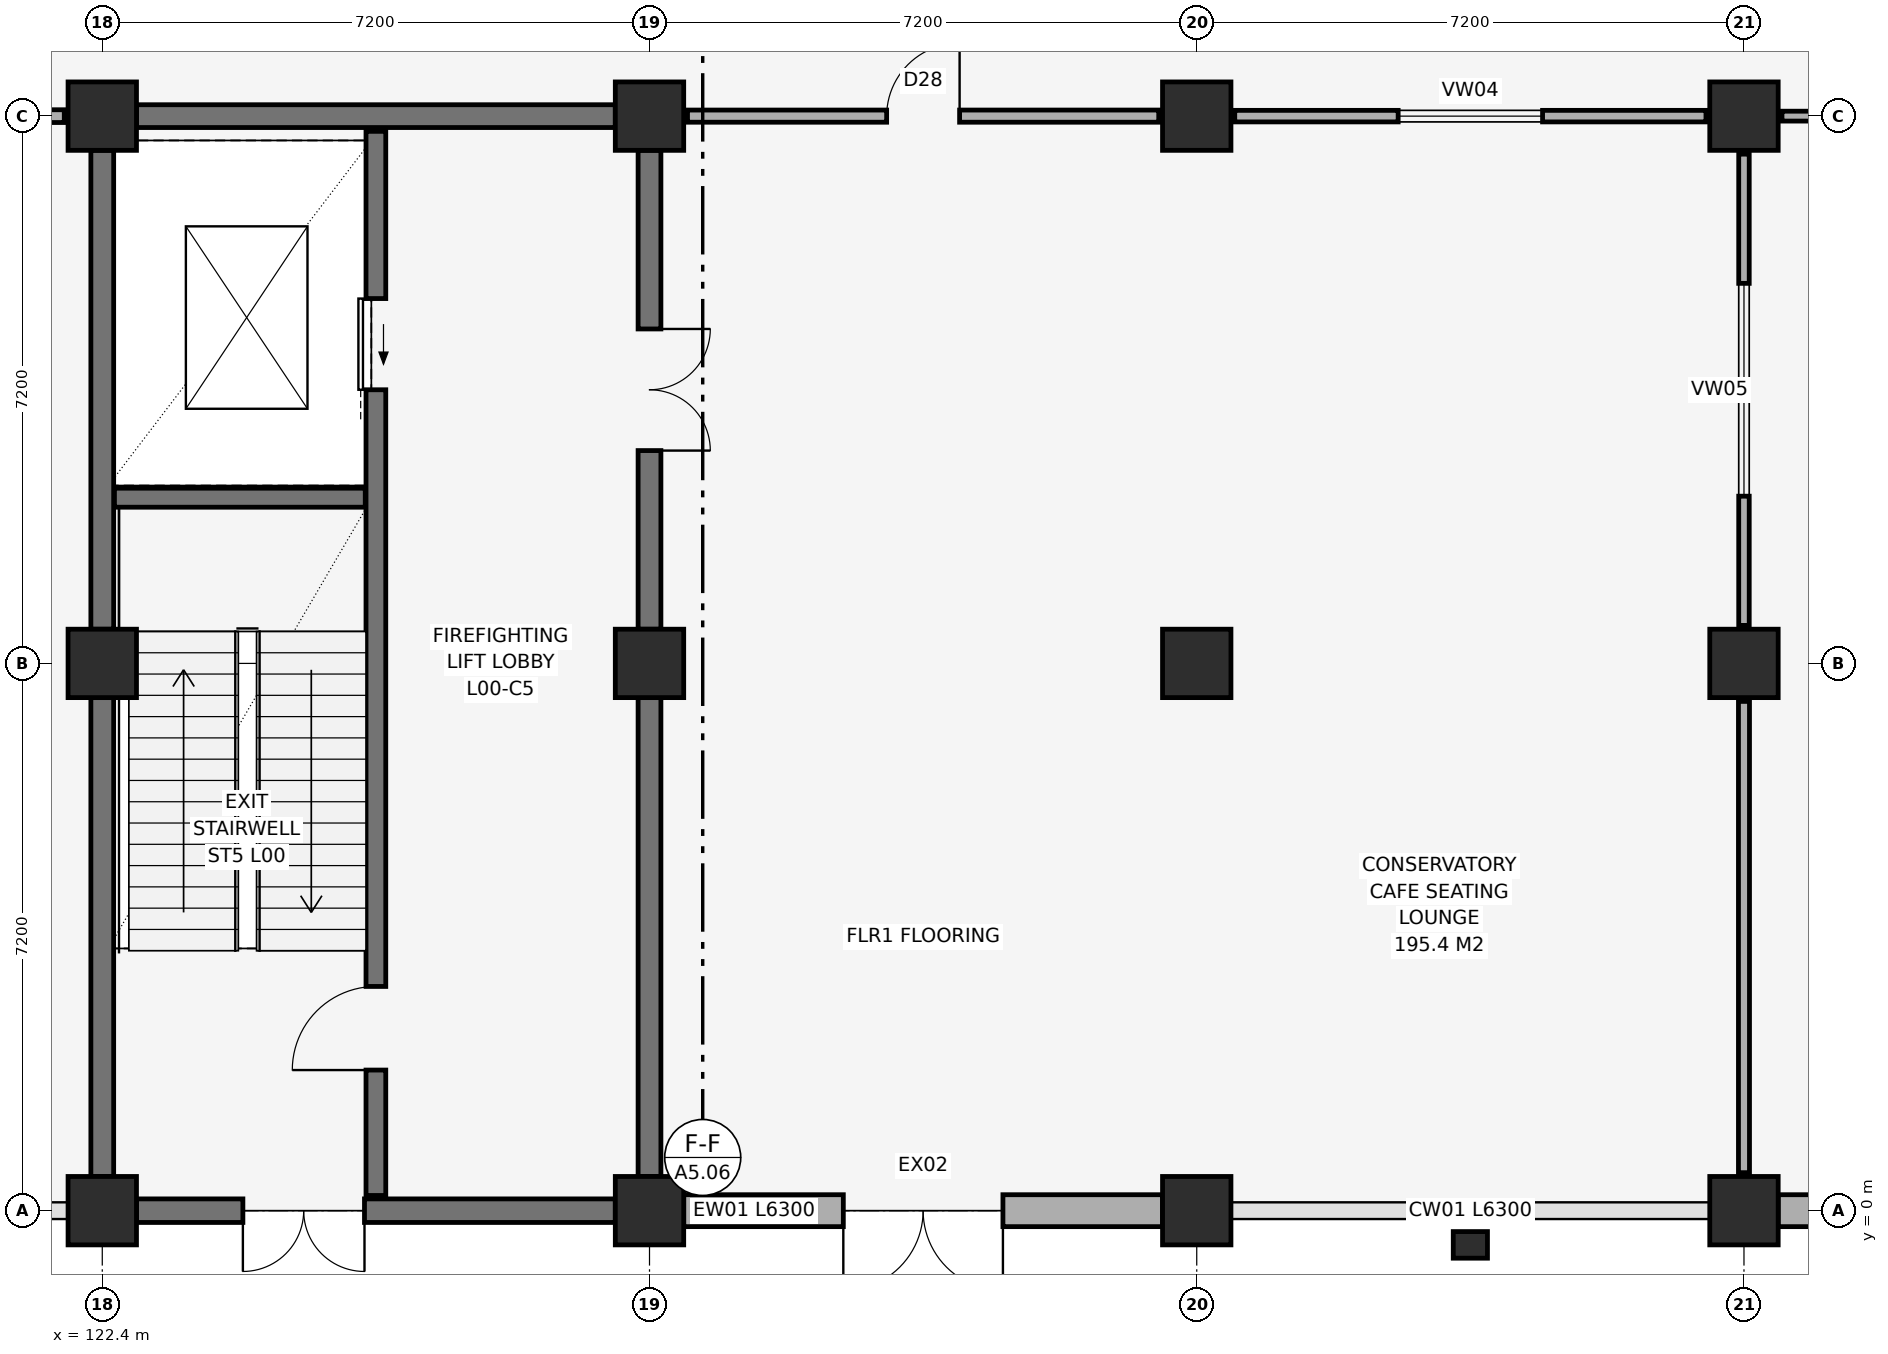
"""IFC4 building model, lengths in metres.
Left out: names, types, materials, properties, quantities, classifications, styles, units other than length and angle.
Written with IfcOpenShell. Run it as: python <this file> out.ifc"""

import sys

from ifc_helpers import new_model, si_unit, direction, frame, frame_2d, origin, origin_2d, place, context, subcontext, project, spatial, rectangle, extrude, element, fill, save


model = new_model("IFC4")
c1 = context("Model", 3, precision=1e-05, world=origin(), true_north=direction((0.0, 1.0)))
c2 = subcontext(c1, "Body", "Model", "MODEL_VIEW")
j1 = project(units=[si_unit("LENGTHUNIT", "METRE"), si_unit("PLANEANGLEUNIT", "RADIAN")], contexts=[c1])
p1 = place(None, origin())
s1 = spatial("IfcSite", under=j1, at=p1, CompositionType="ELEMENT")
p2 = place(p1, origin())
s2 = spatial("IfcBuilding", under=s1, at=p2, CompositionType="ELEMENT")
p3 = place(p2, origin())
s3 = spatial("IfcBuildingStorey", under=s2, at=p3, CompositionType="ELEMENT", Elevation=0.0)
for number, where, z_axis, x_axis in (
    (1, (122.4, 0.0, 0.0), (0.0, 0.0, 1.0), (1.0, 0.0, 0.0)),
    (2, (122.4, 7.2, 0.0), (0.0, 0.0, 1.0), (1.0, 0.0, 0.0)),
    (3, (122.4, 14.4, 0.0), (0.0, 0.0, 1.0), (1.0, 0.0, 0.0)),
    (4, (129.6, 0.0, 0.0), (0.0, 0.0, 1.0), (1.0, 0.0, 0.0)),
    (5, (129.6, 7.2, 0.0), (0.0, 0.0, 1.0), (1.0, 0.0, 0.0)),
    (6, (129.6, 14.4, 0.0), (0.0, 0.0, 1.0), (1.0, 0.0, 0.0)),
    (7, (136.8, 0.0, 0.0), (0.0, 0.0, 1.0), (1.0, 0.0, 0.0)),
    (8, (136.8, 7.2, 0.0), (0.0, 0.0, 1.0), (1.0, 0.0, 0.0)),
    (9, (136.8, 14.4, 0.0), (0.0, 0.0, 1.0), (1.0, 0.0, 0.0)),
    (10, (144.0, 0.0, 0.0), (0.0, 0.0, 1.0), (1.0, 0.0, 0.0)),
    (11, (144.0, 7.2, 0.0), (0.0, 0.0, 1.0), (1.0, 0.0, 0.0)),
    (12, (144.0, 14.4, 0.0), (0.0, 0.0, 1.0), (1.0, 0.0, 0.0)),
):
    element("IfcColumn", number, at=place(p3, frame(where, z_axis=z_axis, x_axis=x_axis)), inside=s3, PredefinedType="COLUMN", context=c2, shape_type="SweptSolid", body=[
        extrude(rectangle(XDim=0.9, YDim=0.9, at=origin_2d()), origin(), (0.0, 0.0, 1.0), 5.4),
    ])
p4 = place(p3, frame((130.05, 0.0, 0.0), z_axis=(0.0, 0.0, 1.0), x_axis=(1.0, 0.0, 0.0)))
e13 = element("IfcWall", 13, at=p4, inside=s3, PredefinedType="SOLIDWALL", context=c2, shape_type="SweptSolid", body=[
    extrude(rectangle(XDim=6.3, YDim=0.42, at=frame_2d((3.15, 0.0))), origin(), (0.0, 0.0, 1.0), 4.64),
])
p5 = place(p4, frame((2.1, 0.0, 0.0)))
e14 = element("IfcOpeningElement", 14, at=p5, cuts=e13, PredefinedType="OPENING", context=c2, shape_type="SweptSolid", body=[
    extrude(rectangle(XDim=2.1, YDim=2.4, at=frame_2d((1.05, 1.2))), frame((0.0, 0.225, 0.0), z_axis=(0.0, -1.0, 0.0), x_axis=(1.0, 0.0, 0.0)), (0.0, 0.0, 1.0), 0.45),
])
p6 = place(p3, frame((144.45, 0.0, 0.0), z_axis=(0.0, 0.0, 1.0), x_axis=(1.0, 0.0, 0.0)))
e15 = element("IfcWall", 15, at=p6, inside=s3, PredefinedType="SOLIDWALL", context=c2, shape_type="SweptSolid", body=[
    extrude(rectangle(XDim=6.3, YDim=0.42, at=frame_2d((3.15, 0.0))), origin(), (0.0, 0.0, 1.0), 4.64),
])
p7 = place(p6, frame((2.15, 0.0, 0.0)))
e16 = element("IfcOpeningElement", 16, at=p7, cuts=e15, PredefinedType="OPENING", context=c2, shape_type="SweptSolid", body=[
    extrude(rectangle(XDim=2.0, YDim=2.3, at=frame_2d((1.0, 1.15))), frame((0.0, 0.225, 0.0), z_axis=(0.0, -1.0, 0.0), x_axis=(1.0, 0.0, 0.0)), (0.0, 0.0, 1.0), 0.45),
])
p8 = place(p3, frame((122.85, 0.0, 0.0), z_axis=(0.0, 0.0, 1.0), x_axis=(1.0, 0.0, 0.0)))
e17 = element("IfcWall", 17, at=p8, inside=s3, PredefinedType="SHEAR", context=c2, shape_type="SweptSolid", body=[
    extrude(rectangle(XDim=6.3, YDim=0.31, at=frame_2d((3.15, 0.0))), origin(), (0.0, 0.0, 1.0), 5.14),
])
p9 = place(p8, frame((1.4, 0.0, 0.0)))
e18 = element("IfcOpeningElement", 18, at=p9, cuts=e17, PredefinedType="OPENING", context=c2, shape_type="SweptSolid", body=[
    extrude(rectangle(XDim=1.6, YDim=2.3, at=frame_2d((0.8, 1.15))), frame((0.0, 0.17, 0.0), z_axis=(0.0, -1.0, 0.0), x_axis=(1.0, 0.0, 0.0)), (0.0, 0.0, 1.0), 0.34),
])
p10 = place(p3, frame((122.85, 14.4, 0.0), z_axis=(0.0, 0.0, 1.0), x_axis=(1.0, 0.0, 0.0)))
e19 = element("IfcWall", 19, at=p10, inside=s3, PredefinedType="SHEAR", context=c2, shape_type="SweptSolid", body=[
    extrude(rectangle(XDim=6.3, YDim=0.3, at=frame_2d((3.15, 0.0))), origin(), (0.0, 0.0, 1.0), 5.14),
])
for number, where, z_axis, x_axis in (
    (20, (122.4, 0.45, 0.0), (0.0, 0.0, 1.0), (0.0, 1.0, 0.0)),
    (21, (122.4, 7.65, 0.0), (0.0, 0.0, 1.0), (0.0, 1.0, 0.0)),
    (22, (129.6, 0.45, 0.0), (0.0, 0.0, 1.0), (0.0, 1.0, 0.0)),
):
    element("IfcWall", number, at=place(p3, frame(where, z_axis=z_axis, x_axis=x_axis)), inside=s3, PredefinedType="SHEAR", context=c2, shape_type="SweptSolid", body=[
        extrude(rectangle(XDim=6.3, YDim=0.3, at=frame_2d((3.15, 0.0))), origin(), (0.0, 0.0, 1.0), 5.14),
    ])
p11 = place(p3, frame((129.6, 7.65, 0.0), z_axis=(0.0, 0.0, 1.0), x_axis=(0.0, 1.0, 0.0)))
e23 = element("IfcWall", 23, at=p11, inside=s3, PredefinedType="SHEAR", context=c2, shape_type="SweptSolid", body=[
    extrude(rectangle(XDim=6.3, YDim=0.3, at=frame_2d((3.15, 0.0))), origin(), (0.0, 0.0, 1.0), 5.14),
])
p12 = place(p11, frame((2.35, 0.0, 0.0)))
e24 = element("IfcOpeningElement", 24, at=p12, cuts=e23, PredefinedType="OPENING", context=c2, shape_type="SweptSolid", body=[
    extrude(rectangle(XDim=1.6, YDim=2.2, at=frame_2d((0.8, 1.1))), frame((0.0, 0.165, 0.0), z_axis=(0.0, -1.0, 0.0), x_axis=(1.0, 0.0, 0.0)), (0.0, 0.0, 1.0), 0.33),
])
p13 = place(p3, frame((126.0, 0.2, 0.0), z_axis=(0.0, 0.0, 1.0), x_axis=(0.0, 1.0, 0.0)))
e25 = element("IfcWall", 25, at=p13, inside=s3, PredefinedType="SHEAR", context=c2, shape_type="SweptSolid", body=[
    extrude(rectangle(XDim=14.0, YDim=0.26, at=frame_2d((7.0, 0.0))), origin(), (0.0, 0.0, 1.0), 5.14),
])
p14 = place(p13, frame((1.65, 0.0, 0.0)))
e26 = element("IfcOpeningElement", 26, at=p14, cuts=e25, PredefinedType="OPENING", context=c2, shape_type="SweptSolid", body=[
    extrude(rectangle(XDim=1.1, YDim=2.15, at=frame_2d((0.55, 1.075))), frame((0.0, 0.145, 0.0), z_axis=(0.0, -1.0, 0.0), x_axis=(1.0, 0.0, 0.0)), (0.0, 0.0, 1.0), 0.29),
])
p15 = place(p13, frame((10.6, 0.0, 0.0)))
e27 = element("IfcOpeningElement", 27, at=p15, cuts=e25, PredefinedType="OPENING", context=c2, shape_type="SweptSolid", body=[
    extrude(rectangle(XDim=1.2, YDim=2.25, at=frame_2d((0.6, 1.125))), frame((0.0, 0.145, 0.0), z_axis=(0.0, -1.0, 0.0), x_axis=(1.0, 0.0, 0.0)), (0.0, 0.0, 1.0), 0.29),
])
p16 = place(p3, frame((122.56, 9.38, 0.0), z_axis=(0.0, 0.0, 1.0), x_axis=(1.0, 0.0, 0.0)))
e28 = element("IfcWall", 28, at=p16, inside=s3, PredefinedType="SHEAR", context=c2, shape_type="SweptSolid", body=[
    extrude(rectangle(XDim=3.3, YDim=0.25, at=frame_2d((1.65, 0.0))), origin(), (0.0, 0.0, 1.0), 5.14),
])
p17 = place(p3, frame((115.7, 14.4, 0.0), z_axis=(0.0, 0.0, 1.0), x_axis=(1.0, 0.0, 0.0)))
e29 = element("IfcWall", 29, at=p17, inside=s3, PredefinedType="PARTITIONING", context=c2, shape_type="SweptSolid", body=[
    extrude(rectangle(XDim=6.2, YDim=0.168, at=frame_2d((3.1, 0.0))), origin(), (0.0, 0.0, 1.0), 4.29),
])
p18 = place(p17, frame((2.61, 0.0, 0.0)))
e30 = element("IfcOpeningElement", 30, at=p18, cuts=e29, PredefinedType="OPENING", context=c2, shape_type="SweptSolid", body=[
    extrude(rectangle(XDim=0.98, YDim=2.15, at=frame_2d((0.49, 1.075))), frame((0.0, 0.099, 0.0), z_axis=(0.0, -1.0, 0.0), x_axis=(1.0, 0.0, 0.0)), (0.0, 0.0, 1.0), 0.198),
])
p19 = place(p3, frame((130.1, 14.4, 0.0), z_axis=(0.0, 0.0, 1.0), x_axis=(1.0, 0.0, 0.0)))
e31 = element("IfcWall", 31, at=p19, inside=s3, PredefinedType="PARTITIONING", context=c2, shape_type="SweptSolid", body=[
    extrude(rectangle(XDim=6.2, YDim=0.16, at=frame_2d((3.1, 0.0))), origin(), (0.0, 0.0, 1.0), 4.29),
])
p20 = place(p19, frame((2.62, 0.0, 0.0)))
e32 = element("IfcOpeningElement", 32, at=p20, cuts=e31, PredefinedType="OPENING", context=c2, shape_type="SweptSolid", body=[
    extrude(rectangle(XDim=0.96, YDim=2.15, at=frame_2d((0.48, 1.075))), frame((0.0, 0.095, 0.0), z_axis=(0.0, -1.0, 0.0), x_axis=(1.0, 0.0, 0.0)), (0.0, 0.0, 1.0), 0.19),
])
p21 = place(p3, frame((137.3, 14.4, 0.0), z_axis=(0.0, 0.0, 1.0), x_axis=(1.0, 0.0, 0.0)))
e33 = element("IfcWall", 33, at=p21, inside=s3, PredefinedType="PARTITIONING", context=c2, shape_type="SweptSolid", body=[
    extrude(rectangle(XDim=6.2, YDim=0.152, at=frame_2d((3.1, 0.0))), origin(), (0.0, 0.0, 1.0), 4.29),
])
p22 = place(p21, frame((2.15, 0.0, 0.95)))
e34 = element("IfcOpeningElement", 34, at=p22, cuts=e33, PredefinedType="OPENING", context=c2, shape_type="SweptSolid", body=[
    extrude(rectangle(XDim=1.9, YDim=1.5, at=frame_2d((0.95, 0.75))), frame((0.0, 0.091, 0.0), z_axis=(0.0, -1.0, 0.0), x_axis=(1.0, 0.0, 0.0)), (0.0, 0.0, 1.0), 0.182),
])
p23 = place(p3, frame((144.0, 0.5, 0.0), z_axis=(0.0, 0.0, 1.0), x_axis=(0.0, 1.0, 0.0)))
e35 = element("IfcWall", 35, at=p23, inside=s3, PredefinedType="PARTITIONING", context=c2, shape_type="SweptSolid", body=[
    extrude(rectangle(XDim=6.2, YDim=0.145, at=frame_2d((3.1, 0.0))), origin(), (0.0, 0.0, 1.0), 4.34),
])
p24 = place(p3, frame((144.0, 7.7, 0.0), z_axis=(0.0, 0.0, 1.0), x_axis=(0.0, 1.0, 0.0)))
e36 = element("IfcWall", 36, at=p24, inside=s3, PredefinedType="PARTITIONING", context=c2, shape_type="SweptSolid", body=[
    extrude(rectangle(XDim=6.2, YDim=0.138, at=frame_2d((3.1, 0.0))), origin(), (0.0, 0.0, 1.0), 4.44),
])
p25 = place(p24, frame((1.7, 0.0, 0.95)))
e37 = element("IfcOpeningElement", 37, at=p25, cuts=e36, PredefinedType="OPENING", context=c2, shape_type="SweptSolid", body=[
    extrude(rectangle(XDim=2.8, YDim=1.35, at=frame_2d((1.4, 0.675))), frame((0.0, 0.084, 0.0), z_axis=(0.0, -1.0, 0.0), x_axis=(1.0, 0.0, 0.0)), (0.0, 0.0, 1.0), 0.168),
])
p26 = place(p3, frame((144.5, 14.4, 0.0), z_axis=(0.0, 0.0, 1.0), x_axis=(1.0, 0.0, 0.0)))
e38 = element("IfcWall", 38, at=p26, inside=s3, PredefinedType="PARTITIONING", context=c2, shape_type="SweptSolid", body=[
    extrude(rectangle(XDim=6.2, YDim=0.13, at=frame_2d((3.1, 0.0))), origin(), (0.0, 0.0, 1.0), 4.29),
])
p27 = place(p26, frame((2.6, 0.0, 0.0)))
e39 = element("IfcOpeningElement", 39, at=p27, cuts=e38, PredefinedType="OPENING", context=c2, shape_type="SweptSolid", body=[
    extrude(rectangle(XDim=1.0, YDim=2.18, at=frame_2d((0.5, 1.09))), frame((0.0, 0.08, 0.0), z_axis=(0.0, -1.0, 0.0), x_axis=(1.0, 0.0, 0.0)), (0.0, 0.0, 1.0), 0.16),
])
p28 = place(p3, frame((140.4, -0.45, 0.0), z_axis=(0.0, 0.0, 1.0), x_axis=(1.0, 0.0, 0.0)))
e40 = element("IfcColumn", 40, at=p28, inside=s3, PredefinedType="PILASTER", context=c2, shape_type="SweptSolid", body=[
    extrude(rectangle(XDim=0.45, YDim=0.35, at=origin_2d()), origin(), (0.0, 0.0, 1.0), 5.1),
])
p29 = place(p5, frame((2.1, 0.0, 0.0), z_axis=(0.0, 0.0, 1.0), x_axis=(-1.0, 0.0, 0.0)))
e41 = element("IfcDoor", 41, at=p29, inside=s3, OperationType="DOUBLE_SWING_LEFT", PredefinedType="DOOR", context=c2, shape_type="SweptSolid", body=[
    extrude(rectangle(XDim=2.1, YDim=2.4, at=frame_2d((1.05, 1.2))), frame((0.0, 0.025, 0.0), z_axis=(0.0, -1.0, 0.0), x_axis=(1.0, 0.0, 0.0)), (0.0, 0.0, 1.0), 0.05),
])
fill(e14, e41)
p30 = place(p14, origin())
e42 = element("IfcDoor", 42, at=p30, inside=s3, OperationType="SINGLE_SWING_LEFT", PredefinedType="DOOR", context=c2, shape_type="SweptSolid", body=[
    extrude(rectangle(XDim=1.1, YDim=2.15, at=frame_2d((0.55, 1.075))), frame((0.0, 0.025, 0.0), z_axis=(0.0, -1.0, 0.0), x_axis=(1.0, 0.0, 0.0)), (0.0, 0.0, 1.0), 0.05),
])
fill(e26, e42)
p31 = place(p15, frame((1.2, 0.0, 0.0), z_axis=(0.0, 0.0, 1.0), x_axis=(-1.0, 0.0, 0.0)))
e43 = element("IfcDoor", 43, at=p31, inside=s3, OperationType="SLIDING_TO_LEFT", PredefinedType="DOOR", context=c2, shape_type="SweptSolid", body=[
    extrude(rectangle(XDim=1.2, YDim=2.25, at=frame_2d((0.6, 1.125))), frame((0.0, 0.025, 0.0), z_axis=(0.0, -1.0, 0.0), x_axis=(1.0, 0.0, 0.0)), (0.0, 0.0, 1.0), 0.05),
])
fill(e27, e43)
p32 = place(p12, frame((1.6, 0.0, 0.0), z_axis=(0.0, 0.0, 1.0), x_axis=(-1.0, 0.0, 0.0)))
e44 = element("IfcDoor", 44, at=p32, inside=s3, OperationType="DOUBLE_SWING_LEFT", PredefinedType="DOOR", context=c2, shape_type="SweptSolid", body=[
    extrude(rectangle(XDim=1.6, YDim=2.2, at=frame_2d((0.8, 1.1))), frame((0.0, 0.025, 0.0), z_axis=(0.0, -1.0, 0.0), x_axis=(1.0, 0.0, 0.0)), (0.0, 0.0, 1.0), 0.05),
])
fill(e24, e44)
p33 = place(p9, frame((1.6, 0.0, 0.0), z_axis=(0.0, 0.0, 1.0), x_axis=(-1.0, 0.0, 0.0)))
e45 = element("IfcDoor", 45, at=p33, inside=s3, OperationType="DOUBLE_SWING_LEFT", PredefinedType="DOOR", context=c2, shape_type="SweptSolid", body=[
    extrude(rectangle(XDim=1.6, YDim=2.3, at=frame_2d((0.8, 1.15))), frame((0.0, 0.025, 0.0), z_axis=(0.0, -1.0, 0.0), x_axis=(1.0, 0.0, 0.0)), (0.0, 0.0, 1.0), 0.05),
])
fill(e18, e45)
p34 = place(p20, frame((0.96, 0.0, 0.0), z_axis=(0.0, 0.0, 1.0), x_axis=(-1.0, 0.0, 0.0)))
e46 = element("IfcDoor", 46, at=p34, inside=s3, OperationType="SINGLE_SWING_LEFT", PredefinedType="DOOR", context=c2, shape_type="SweptSolid", body=[
    extrude(rectangle(XDim=0.96, YDim=2.15, at=frame_2d((0.48, 1.075))), frame((0.0, 0.025, 0.0), z_axis=(0.0, -1.0, 0.0), x_axis=(1.0, 0.0, 0.0)), (0.0, 0.0, 1.0), 0.05),
])
fill(e32, e46)
p35 = place(p22, origin())
e47 = element("IfcWindow", 47, at=p35, inside=s3, PartitioningType="SINGLE_PANEL", PredefinedType="WINDOW", context=c2, shape_type="SweptSolid", body=[
    extrude(rectangle(XDim=1.9, YDim=1.5, at=frame_2d((0.95, 0.75))), frame((0.0, 0.03, 0.0), z_axis=(0.0, -1.0, 0.0), x_axis=(1.0, 0.0, 0.0)), (0.0, 0.0, 1.0), 0.06),
])
fill(e34, e47)
p36 = place(p25, origin())
e48 = element("IfcWindow", 48, at=p36, inside=s3, PartitioningType="SINGLE_PANEL", PredefinedType="WINDOW", context=c2, shape_type="SweptSolid", body=[
    extrude(rectangle(XDim=2.8, YDim=1.35, at=frame_2d((1.4, 0.675))), frame((0.0, 0.03, 0.0), z_axis=(0.0, -1.0, 0.0), x_axis=(1.0, 0.0, 0.0)), (0.0, 0.0, 1.0), 0.06),
])
fill(e37, e48)
save(model, sys.argv[1])
